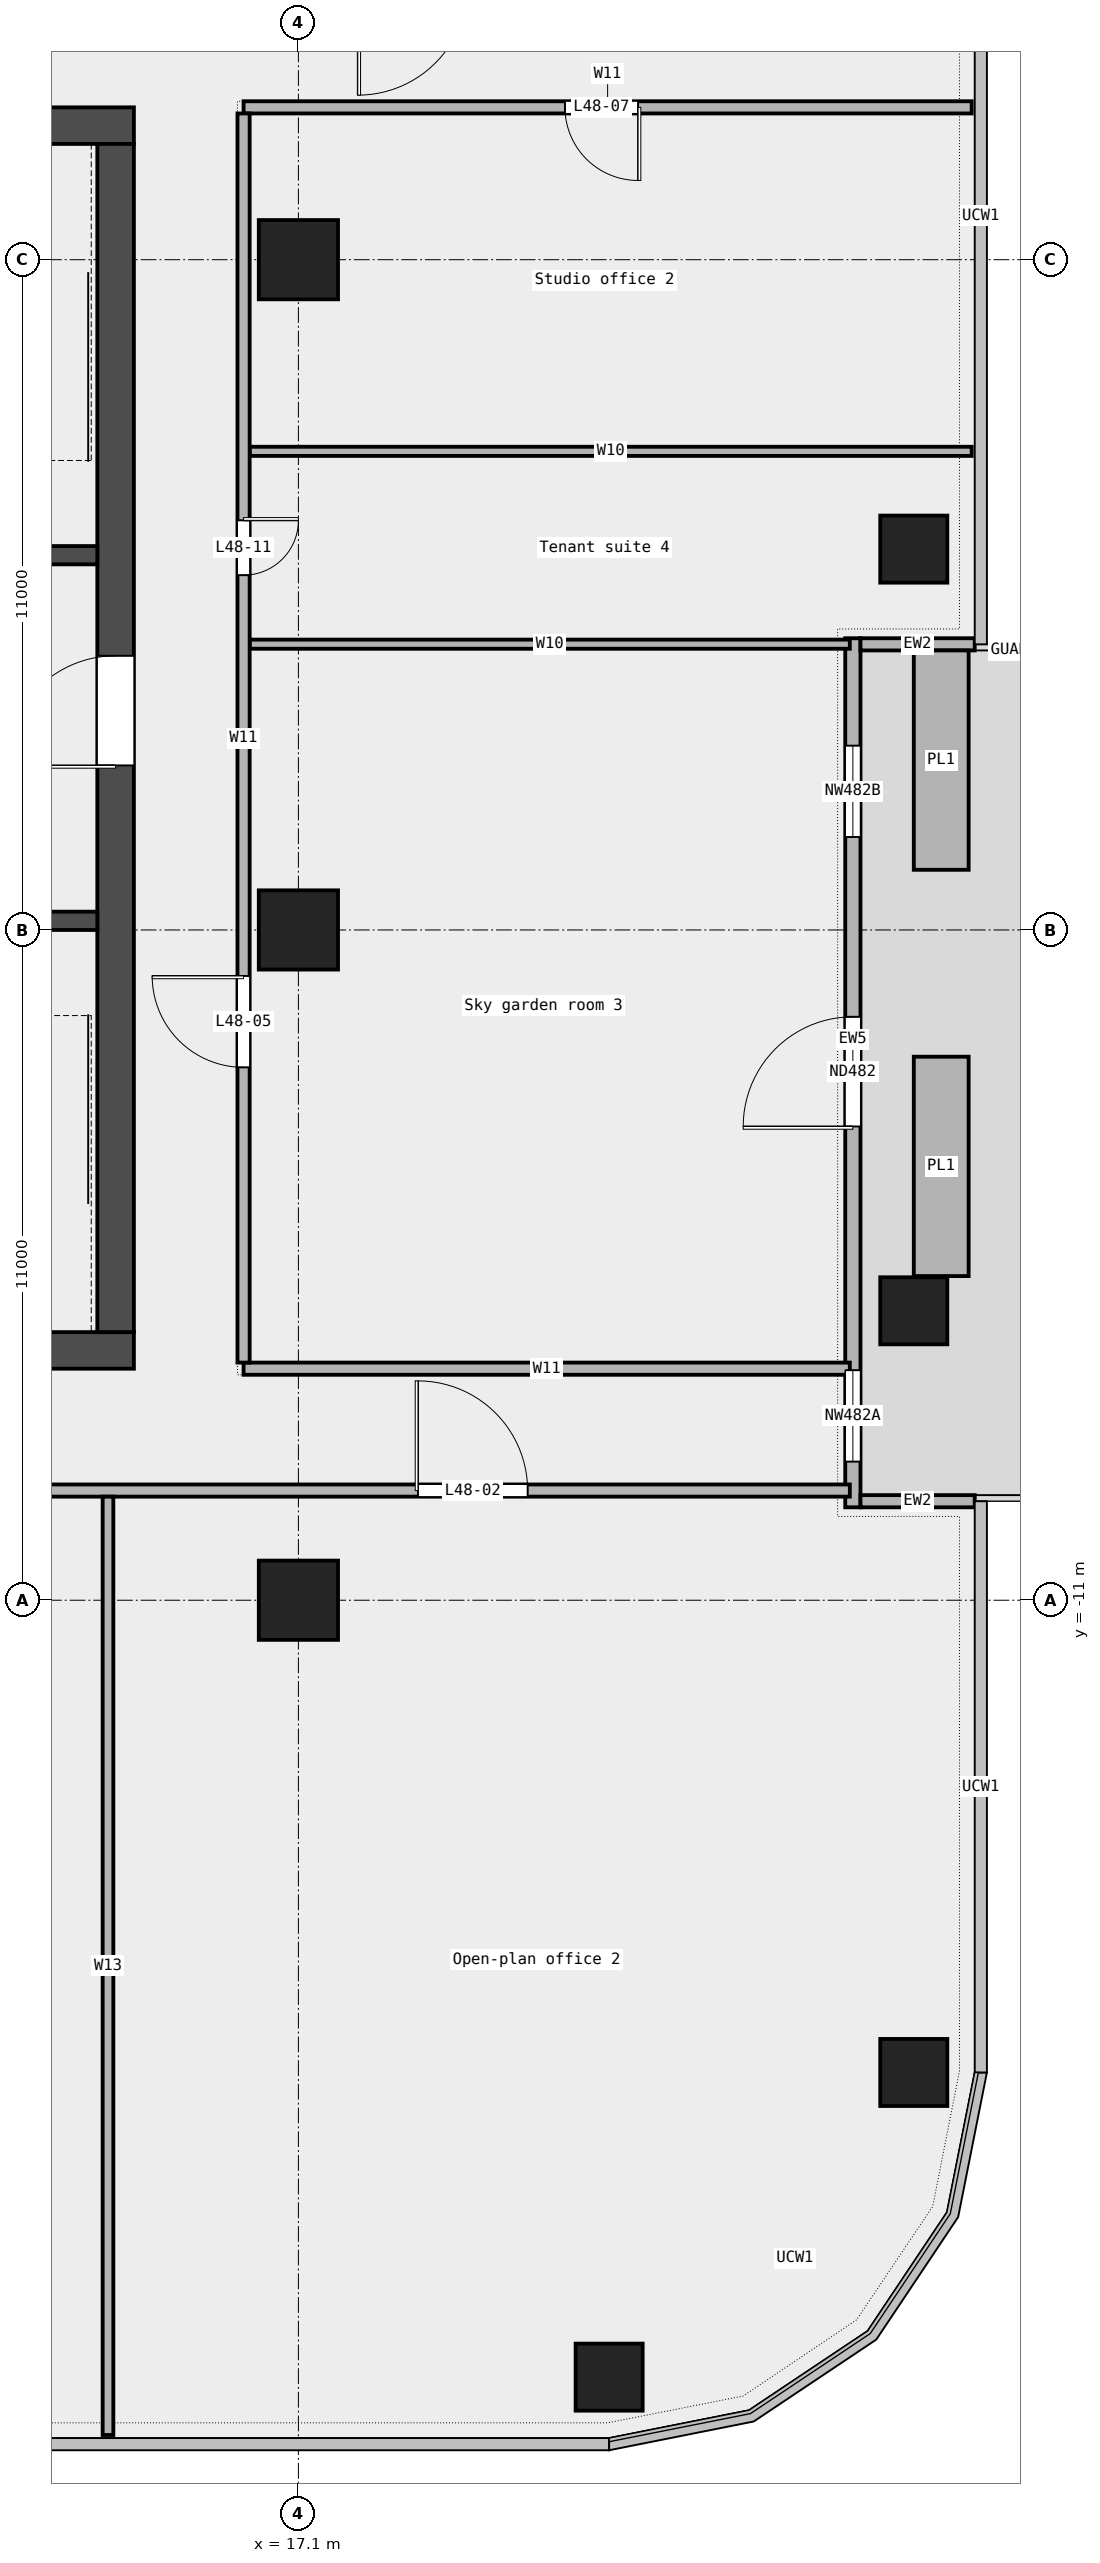
"""IFC4 building model, lengths in metres.
Left out: names, types, materials, properties, quantities, classifications, styles, units other than length and angle.
Written with IfcOpenShell. Run it as: python <this file> out.ifc"""

import sys

from ifc_helpers import new_model, si_unit, direction, frame, frame_2d, origin, origin_2d, place, context, subcontext, project, spatial, rectangle, extrude, element, fill, save


model = new_model("IFC4")
c1 = context("Model", 3, precision=1e-05, world=origin(), true_north=direction((0.0, 1.0)))
c2 = subcontext(c1, "Body", "Model", "MODEL_VIEW")
j1 = project(units=[si_unit("LENGTHUNIT", "METRE"), si_unit("PLANEANGLEUNIT", "RADIAN")], contexts=[c1])
p1 = place(None, origin())
s1 = spatial("IfcSite", under=j1, at=p1, CompositionType="ELEMENT")
p2 = place(p1, origin())
s2 = spatial("IfcBuilding", under=s1, at=p2, CompositionType="ELEMENT")
p3 = place(p2, frame((0.0, 0.0, 227.0)))
s3 = spatial("IfcBuildingStorey", under=s2, at=p3, CompositionType="ELEMENT", Elevation=227.0)
for number, where, z_axis, x_axis in (
    (1, (22.2, -23.75, 0.0), (0.0, 0.0, 1.0), (1.0, 0.0, 0.0)),
    (2, (27.2, -18.75, 0.0), (0.0, 0.0, 1.0), (1.0, 0.0, 0.0)),
    (3, (27.2, -6.25, 0.0), (0.0, 0.0, 1.0), (1.0, 0.0, 0.0)),
    (4, (27.2, 6.25, 0.0), (0.0, 0.0, 1.0), (1.0, 0.0, 0.0)),
):
    element("IfcColumn", number, at=place(p3, frame(where, z_axis=z_axis, x_axis=x_axis)), inside=s3, PredefinedType="COLUMN", context=c2, shape_type="SweptSolid", body=[
        extrude(rectangle(XDim=1.1, YDim=1.1, at=origin_2d()), origin(), (0.0, 0.0, 1.0), 3.6),
    ])
for number, where, z_axis, x_axis in (
    (5, (17.1, -11.0, 0.0), (0.0, 0.0, 1.0), (1.0, 0.0, 0.0)),
    (6, (17.1, 0.0, 0.0), (0.0, 0.0, 1.0), (1.0, 0.0, 0.0)),
    (7, (17.1, 11.0, 0.0), (0.0, 0.0, 1.0), (1.0, 0.0, 0.0)),
):
    element("IfcColumn", number, at=place(p3, frame(where, z_axis=z_axis, x_axis=x_axis)), inside=s3, PredefinedType="COLUMN", context=c2, shape_type="SweptSolid", body=[
        extrude(rectangle(XDim=1.3, YDim=1.3, at=origin_2d()), origin(), (0.0, 0.0, 1.0), 3.6),
    ])
p4 = place(p3, frame((26.2, -9.475, 0.0), z_axis=(0.0, 0.0, 1.0), x_axis=(0.0, 1.0, 0.0)))
e8 = element("IfcWall", 8, at=p4, inside=s3, PredefinedType="STANDARD", context=c2, shape_type="SweptSolid", body=[
    extrude(rectangle(XDim=14.263, YDim=0.25, at=frame_2d((7.131, 0.0))), origin(), (0.0, 0.0, 1.0), 3.6),
])
p5 = place(p4, frame((0.75, 0.0, 0.45)))
e9 = element("IfcOpeningElement", 9, at=p5, cuts=e8, PredefinedType="OPENING", context=c2, shape_type="SweptSolid", body=[
    extrude(rectangle(XDim=1.5, YDim=2.4, at=frame_2d((0.75, 1.2))), frame((0.0, 0.137, 0.0), z_axis=(0.0, -1.0, 0.0), x_axis=(1.0, 0.0, 0.0)), (0.0, 0.0, 1.0), 0.274),
])
p6 = place(p4, frame((6.25, 0.0, 0.0)))
e10 = element("IfcOpeningElement", 10, at=p6, cuts=e8, PredefinedType="OPENING", context=c2, shape_type="SweptSolid", body=[
    extrude(rectangle(XDim=1.8, YDim=2.4, at=frame_2d((0.9, 1.2))), frame((0.0, 0.137, 0.0), z_axis=(0.0, -1.0, 0.0), x_axis=(1.0, 0.0, 0.0)), (0.0, 0.0, 1.0), 0.274),
])
p7 = place(p4, frame((11.0, 0.0, 0.45)))
e11 = element("IfcOpeningElement", 11, at=p7, cuts=e8, PredefinedType="OPENING", context=c2, shape_type="SweptSolid", body=[
    extrude(rectangle(XDim=1.5, YDim=2.4, at=frame_2d((0.75, 1.2))), frame((0.0, 0.137, 0.0), z_axis=(0.0, -1.0, 0.0), x_axis=(1.0, 0.0, 0.0)), (0.0, 0.0, 1.0), 0.274),
])
for number, where, z_axis, x_axis in (
    (12, (28.2, -9.375, 0.0), (0.0, 0.0, 1.0), (-1.0, 0.0, 0.0)),
    (13, (28.2, 4.688, 0.0), (0.0, 0.0, 1.0), (-1.0, 0.0, 0.0)),
):
    element("IfcWall", number, at=place(p3, frame(where, z_axis=z_axis, x_axis=x_axis)), inside=s3, PredefinedType="STANDARD", context=c2, shape_type="SweptSolid", body=[
        extrude(rectangle(XDim=1.875, YDim=0.2, at=frame_2d((0.938, 0.0))), origin(), (0.0, 0.0, 1.0), 3.6),
    ])
for number, where, z_axis, x_axis in (
    (14, (27.65, -5.68, 0.0), (0.0, 0.0, 1.0), (0.0, 1.0, 0.0)),
    (15, (27.65, 0.988, 0.0), (0.0, 0.0, 1.0), (0.0, 1.0, 0.0)),
):
    element("IfcWall", number, at=place(p3, frame(where, z_axis=z_axis, x_axis=x_axis)), inside=s3, PredefinedType="STANDARD", context=c2, shape_type="SweptSolid", body=[
        extrude(rectangle(XDim=3.6, YDim=0.9, at=frame_2d((1.8, 0.0))), origin(), (0.0, 0.0, 1.0), 0.7),
    ])
p8 = place(p3, frame((-28.15, -9.2, 0.0), z_axis=(0.0, 0.0, 1.0), x_axis=(1.0, 0.0, 0.0)))
e16 = element("IfcWall", 16, at=p8, inside=s3, PredefinedType="PARTITIONING", context=c2, shape_type="SweptSolid", body=[
    extrude(rectangle(XDim=54.3, YDim=0.2, at=frame_2d((27.15, 0.0))), origin(), (0.0, 0.0, 1.0), 3.6),
])
p9 = place(p8, frame((47.212, 0.0, 0.0)))
e17 = element("IfcOpeningElement", 17, at=p9, cuts=e16, PredefinedType="OPENING", context=c2, shape_type="SweptSolid", body=[
    extrude(rectangle(XDim=1.8, YDim=2.1, at=frame_2d((0.9, 1.05))), frame((0.0, 0.112, 0.0), z_axis=(0.0, -1.0, 0.0), x_axis=(1.0, 0.0, 0.0)), (0.0, 0.0, 1.0), 0.224),
])
p10 = place(p8, frame((16.15, 0.0, 0.0)))
e18 = element("IfcOpeningElement", 18, at=p10, cuts=e16, PredefinedType="OPENING", context=c2, shape_type="SweptSolid", body=[
    extrude(rectangle(XDim=1.8, YDim=2.1, at=frame_2d((0.9, 1.05))), frame((0.0, 0.112, 0.0), z_axis=(0.0, -1.0, 0.0), x_axis=(1.0, 0.0, 0.0)), (0.0, 0.0, 1.0), 0.224),
])
p11 = place(p8, frame((4.545, 0.0, 0.0)))
e19 = element("IfcOpeningElement", 19, at=p11, cuts=e16, PredefinedType="OPENING", context=c2, shape_type="SweptSolid", body=[
    extrude(rectangle(XDim=1.5, YDim=2.1, at=frame_2d((0.75, 1.05))), frame((0.0, 0.112, 0.0), z_axis=(0.0, -1.0, 0.0), x_axis=(1.0, 0.0, 0.0)), (0.0, 0.0, 1.0), 0.224),
])
p12 = place(p8, frame((31.117, 0.0, 0.0)))
e20 = element("IfcOpeningElement", 20, at=p12, cuts=e16, PredefinedType="OPENING", context=c2, shape_type="SweptSolid", body=[
    extrude(rectangle(XDim=1.8, YDim=2.1, at=frame_2d((0.9, 1.05))), frame((0.0, 0.112, 0.0), z_axis=(0.0, -1.0, 0.0), x_axis=(1.0, 0.0, 0.0)), (0.0, 0.0, 1.0), 0.224),
])
p13 = place(p3, frame((16.2, -7.2, 0.0), z_axis=(0.0, 0.0, 1.0), x_axis=(1.0, 0.0, 0.0)))
e21 = element("IfcWall", 21, at=p13, inside=s3, PredefinedType="PARTITIONING", context=c2, shape_type="SweptSolid", body=[
    extrude(rectangle(XDim=9.95, YDim=0.2, at=frame_2d((4.975, 0.0))), origin(), (0.0, 0.0, 1.0), 3.6),
])
p14 = place(p3, frame((16.3, 4.69, 0.0), z_axis=(0.0, 0.0, 1.0), x_axis=(1.0, 0.0, 0.0)))
e22 = element("IfcWall", 22, at=p14, inside=s3, PredefinedType="PARTITIONING", context=c2, shape_type="SweptSolid", body=[
    extrude(rectangle(XDim=9.85, YDim=0.15, at=frame_2d((4.925, 0.0))), origin(), (0.0, 0.0, 1.0), 3.6),
])
p15 = place(p3, frame((16.3, 7.855, 0.0), z_axis=(0.0, 0.0, 1.0), x_axis=(1.0, 0.0, 0.0)))
e23 = element("IfcWall", 23, at=p15, inside=s3, PredefinedType="PARTITIONING", context=c2, shape_type="SweptSolid", body=[
    extrude(rectangle(XDim=11.85, YDim=0.15, at=frame_2d((5.925, 0.0))), origin(), (0.0, 0.0, 1.0), 3.6),
])
p16 = place(p3, frame((16.2, 13.5, 0.0), z_axis=(0.0, 0.0, 1.0), x_axis=(1.0, 0.0, 0.0)))
e24 = element("IfcWall", 24, at=p16, inside=s3, PredefinedType="PARTITIONING", context=c2, shape_type="SweptSolid", body=[
    extrude(rectangle(XDim=11.95, YDim=0.2, at=frame_2d((5.975, 0.0))), origin(), (0.0, 0.0, 1.0), 3.6),
])
p17 = place(p16, frame((5.275, 0.0, 0.0)))
e25 = element("IfcOpeningElement", 25, at=p17, cuts=e24, PredefinedType="OPENING", context=c2, shape_type="SweptSolid", body=[
    extrude(rectangle(XDim=1.2, YDim=2.1, at=frame_2d((0.6, 1.05))), frame((0.0, 0.112, 0.0), z_axis=(0.0, -1.0, 0.0), x_axis=(1.0, 0.0, 0.0)), (0.0, 0.0, 1.0), 0.224),
])
p18 = place(p3, frame((13.975, -24.7, 0.0), z_axis=(0.0, 0.0, 1.0), x_axis=(0.0, 1.0, 0.0)))
e26 = element("IfcWall", 26, at=p18, inside=s3, PredefinedType="PARTITIONING", context=c2, shape_type="SweptSolid", body=[
    extrude(rectangle(XDim=15.4, YDim=0.175, at=frame_2d((7.7, 0.0))), origin(), (0.0, 0.0, 1.0), 3.6),
])
p19 = place(p3, frame((16.2, -7.1, 0.0), z_axis=(0.0, 0.0, 1.0), x_axis=(0.0, 1.0, 0.0)))
e27 = element("IfcWall", 27, at=p19, inside=s3, PredefinedType="PARTITIONING", context=c2, shape_type="SweptSolid", body=[
    extrude(rectangle(XDim=20.5, YDim=0.2, at=frame_2d((10.25, 0.0))), origin(), (0.0, 0.0, 1.0), 3.6),
])
p20 = place(p19, frame((4.845, 0.0, 0.0)))
e28 = element("IfcOpeningElement", 28, at=p20, cuts=e27, PredefinedType="OPENING", context=c2, shape_type="SweptSolid", body=[
    extrude(rectangle(XDim=1.5, YDim=2.1, at=frame_2d((0.75, 1.05))), frame((0.0, 0.112, 0.0), z_axis=(0.0, -1.0, 0.0), x_axis=(1.0, 0.0, 0.0)), (0.0, 0.0, 1.0), 0.224),
])
p21 = place(p19, frame((12.923, 0.0, 0.0)))
e29 = element("IfcOpeningElement", 29, at=p21, cuts=e27, PredefinedType="OPENING", context=c2, shape_type="SweptSolid", body=[
    extrude(rectangle(XDim=0.9, YDim=2.1, at=frame_2d((0.45, 1.05))), frame((0.0, 0.112, 0.0), z_axis=(0.0, -1.0, 0.0), x_axis=(1.0, 0.0, 0.0)), (0.0, 0.0, 1.0), 0.224),
])
p22 = place(p3, frame((-14.4, -6.9, 0.0), z_axis=(0.0, 0.0, 1.0), x_axis=(1.0, 0.0, 0.0)))
e30 = element("IfcWall", 30, at=p22, inside=s3, PredefinedType="SHEAR", context=c2, shape_type="SweptSolid", body=[
    extrude(rectangle(XDim=28.8, YDim=0.6, at=frame_2d((14.4, 0.0))), origin(), (0.0, 0.0, 1.0), 3.7),
])
p23 = place(p22, frame((4.337, 0.0, 0.0)))
e31 = element("IfcOpeningElement", 31, at=p23, cuts=e30, PredefinedType="OPENING", context=c2, shape_type="SweptSolid", body=[
    extrude(rectangle(XDim=1.0, YDim=2.1, at=frame_2d((0.5, 1.05))), frame((0.0, 0.312, 0.0), z_axis=(0.0, -1.0, 0.0), x_axis=(1.0, 0.0, 0.0)), (0.0, 0.0, 1.0), 0.624),
])
p24 = place(p22, frame((6.212, 0.0, 0.0)))
e32 = element("IfcOpeningElement", 32, at=p24, cuts=e30, PredefinedType="OPENING", context=c2, shape_type="SweptSolid", body=[
    extrude(rectangle(XDim=1.0, YDim=2.1, at=frame_2d((0.5, 1.05))), frame((0.0, 0.312, 0.0), z_axis=(0.0, -1.0, 0.0), x_axis=(1.0, 0.0, 0.0)), (0.0, 0.0, 1.0), 0.624),
])
p25 = place(p22, frame((8.087, 0.0, 0.0)))
e33 = element("IfcOpeningElement", 33, at=p25, cuts=e30, PredefinedType="OPENING", context=c2, shape_type="SweptSolid", body=[
    extrude(rectangle(XDim=1.0, YDim=2.1, at=frame_2d((0.5, 1.05))), frame((0.0, 0.312, 0.0), z_axis=(0.0, -1.0, 0.0), x_axis=(1.0, 0.0, 0.0)), (0.0, 0.0, 1.0), 0.624),
])
p26 = place(p22, frame((12.675, 0.0, 0.0)))
e34 = element("IfcOpeningElement", 34, at=p26, cuts=e30, PredefinedType="OPENING", context=c2, shape_type="SweptSolid", body=[
    extrude(rectangle(XDim=1.2, YDim=2.1, at=frame_2d((0.6, 1.05))), frame((0.0, 0.312, 0.0), z_axis=(0.0, -1.0, 0.0), x_axis=(1.0, 0.0, 0.0)), (0.0, 0.0, 1.0), 0.624),
])
p27 = place(p22, frame((18.75, 0.0, 0.0)))
e35 = element("IfcOpeningElement", 35, at=p27, cuts=e30, PredefinedType="OPENING", context=c2, shape_type="SweptSolid", body=[
    extrude(rectangle(XDim=1.8, YDim=2.1, at=frame_2d((0.9, 1.05))), frame((0.0, 0.312, 0.0), z_axis=(0.0, -1.0, 0.0), x_axis=(1.0, 0.0, 0.0)), (0.0, 0.0, 1.0), 0.624),
])
p28 = place(p22, frame((23.087, 0.0, 0.0)))
e36 = element("IfcOpeningElement", 36, at=p28, cuts=e30, PredefinedType="OPENING", context=c2, shape_type="SweptSolid", body=[
    extrude(rectangle(XDim=1.0, YDim=2.1, at=frame_2d((0.5, 1.05))), frame((0.0, 0.312, 0.0), z_axis=(0.0, -1.0, 0.0), x_axis=(1.0, 0.0, 0.0)), (0.0, 0.0, 1.0), 0.624),
])
p29 = place(p3, frame((-14.4, 13.2, 0.0), z_axis=(0.0, 0.0, 1.0), x_axis=(1.0, 0.0, 0.0)))
e37 = element("IfcWall", 37, at=p29, inside=s3, PredefinedType="SHEAR", context=c2, shape_type="SweptSolid", body=[
    extrude(rectangle(XDim=28.8, YDim=0.6, at=frame_2d((14.4, 0.0))), origin(), (0.0, 0.0, 1.0), 3.7),
])
p30 = place(p29, frame((6.3, 0.0, 0.0)))
e38 = element("IfcOpeningElement", 38, at=p30, cuts=e37, PredefinedType="OPENING", context=c2, shape_type="SweptSolid", body=[
    extrude(rectangle(XDim=1.2, YDim=2.1, at=frame_2d((0.6, 1.05))), frame((0.0, 0.312, 0.0), z_axis=(0.0, -1.0, 0.0), x_axis=(1.0, 0.0, 0.0)), (0.0, 0.0, 1.0), 0.624),
])
p31 = place(p29, frame((21.3, 0.0, 0.0)))
e39 = element("IfcOpeningElement", 39, at=p31, cuts=e37, PredefinedType="OPENING", context=c2, shape_type="SweptSolid", body=[
    extrude(rectangle(XDim=1.2, YDim=2.1, at=frame_2d((0.6, 1.05))), frame((0.0, 0.312, 0.0), z_axis=(0.0, -1.0, 0.0), x_axis=(1.0, 0.0, 0.0)), (0.0, 0.0, 1.0), 0.624),
])
p32 = place(p3, frame((14.1, -6.6, 0.0), z_axis=(0.0, 0.0, 1.0), x_axis=(0.0, 1.0, 0.0)))
e40 = element("IfcWall", 40, at=p32, inside=s3, PredefinedType="SHEAR", context=c2, shape_type="SweptSolid", body=[
    extrude(rectangle(XDim=19.5, YDim=0.6, at=frame_2d((9.75, 0.0))), origin(), (0.0, 0.0, 1.0), 3.7),
])
p33 = place(p32, frame((9.3, 0.0, 0.0)))
e41 = element("IfcOpeningElement", 41, at=p33, cuts=e40, PredefinedType="OPENING", context=c2, shape_type="SweptSolid", body=[
    extrude(rectangle(XDim=1.8, YDim=2.1, at=frame_2d((0.9, 1.05))), frame((0.0, 0.312, 0.0), z_axis=(0.0, -1.0, 0.0), x_axis=(1.0, 0.0, 0.0)), (0.0, 0.0, 1.0), 0.624),
])
p34 = place(p3, frame((10.65, 0.15, 0.0), z_axis=(0.0, 0.0, 1.0), x_axis=(1.0, 0.0, 0.0)))
e42 = element("IfcWall", 42, at=p34, inside=s3, PredefinedType="SOLIDWALL", context=c2, shape_type="SweptSolid", body=[
    extrude(rectangle(XDim=3.15, YDim=0.3, at=frame_2d((1.575, 0.0))), origin(), (0.0, 0.0, 1.0), 3.7),
])
p35 = place(p34, frame((1.025, 0.0, 0.0)))
e43 = element("IfcOpeningElement", 43, at=p35, cuts=e42, PredefinedType="OPENING", context=c2, shape_type="SweptSolid", body=[
    extrude(rectangle(XDim=1.1, YDim=2.1, at=frame_2d((0.55, 1.05))), frame((0.0, 0.162, 0.0), z_axis=(0.0, -1.0, 0.0), x_axis=(1.0, 0.0, 0.0)), (0.0, 0.0, 1.0), 0.324),
])
p36 = place(p3, frame((10.65, 6.15, 0.0), z_axis=(0.0, 0.0, 1.0), x_axis=(1.0, 0.0, 0.0)))
e44 = element("IfcWall", 44, at=p36, inside=s3, PredefinedType="SOLIDWALL", context=c2, shape_type="SweptSolid", body=[
    extrude(rectangle(XDim=3.15, YDim=0.3, at=frame_2d((1.575, 0.0))), origin(), (0.0, 0.0, 1.0), 3.7),
])
p37 = place(p36, frame((1.025, 0.0, 0.0)))
e45 = element("IfcOpeningElement", 45, at=p37, cuts=e44, PredefinedType="OPENING", context=c2, shape_type="SweptSolid", body=[
    extrude(rectangle(XDim=1.1, YDim=2.1, at=frame_2d((0.55, 1.05))), frame((0.0, 0.162, 0.0), z_axis=(0.0, -1.0, 0.0), x_axis=(1.0, 0.0, 0.0)), (0.0, 0.0, 1.0), 0.324),
])
p38 = place(p5, origin())
e46 = element("IfcWindow", 46, at=p38, inside=s3, PartitioningType="SINGLE_PANEL", PredefinedType="WINDOW", context=c2, shape_type="SweptSolid", body=[
    extrude(rectangle(XDim=1.5, YDim=2.4, at=frame_2d((0.75, 1.2))), frame((0.0, 0.03, 0.0), z_axis=(0.0, -1.0, 0.0), x_axis=(1.0, 0.0, 0.0)), (0.0, 0.0, 1.0), 0.06),
])
fill(e9, e46)
p39 = place(p6, origin())
e47 = element("IfcDoor", 47, at=p39, inside=s3, OperationType="DOUBLE_DOOR_SINGLE_SWING", PredefinedType="DOOR", context=c2, shape_type="SweptSolid", body=[
    extrude(rectangle(XDim=1.8, YDim=2.4, at=frame_2d((0.9, 1.2))), frame((0.0, 0.025, 0.0), z_axis=(0.0, -1.0, 0.0), x_axis=(1.0, 0.0, 0.0)), (0.0, 0.0, 1.0), 0.05),
])
fill(e10, e47)
p40 = place(p7, origin())
e48 = element("IfcWindow", 48, at=p40, inside=s3, PartitioningType="SINGLE_PANEL", PredefinedType="WINDOW", context=c2, shape_type="SweptSolid", body=[
    extrude(rectangle(XDim=1.5, YDim=2.4, at=frame_2d((0.75, 1.2))), frame((0.0, 0.03, 0.0), z_axis=(0.0, -1.0, 0.0), x_axis=(1.0, 0.0, 0.0)), (0.0, 0.0, 1.0), 0.06),
])
fill(e11, e48)
p41 = place(p9, origin())
e49 = element("IfcDoor", 49, at=p41, inside=s3, OperationType="DOUBLE_DOOR_SINGLE_SWING", PredefinedType="DOOR", context=c2, shape_type="SweptSolid", body=[
    extrude(rectangle(XDim=1.8, YDim=2.1, at=frame_2d((0.9, 1.05))), frame((0.0, 0.025, 0.0), z_axis=(0.0, -1.0, 0.0), x_axis=(1.0, 0.0, 0.0)), (0.0, 0.0, 1.0), 0.05),
])
fill(e17, e49)
p42 = place(p20, origin())
e50 = element("IfcDoor", 50, at=p42, inside=s3, OperationType="DOUBLE_DOOR_SINGLE_SWING", PredefinedType="DOOR", context=c2, shape_type="SweptSolid", body=[
    extrude(rectangle(XDim=1.5, YDim=2.1, at=frame_2d((0.75, 1.05))), frame((0.0, 0.025, 0.0), z_axis=(0.0, -1.0, 0.0), x_axis=(1.0, 0.0, 0.0)), (0.0, 0.0, 1.0), 0.05),
])
fill(e28, e50)
p43 = place(p17, origin())
e51 = element("IfcDoor", 51, at=p43, inside=s3, OperationType="SINGLE_SWING_LEFT", PredefinedType="DOOR", context=c2, shape_type="SweptSolid", body=[
    extrude(rectangle(XDim=1.2, YDim=2.1, at=frame_2d((0.6, 1.05))), frame((0.0, 0.025, 0.0), z_axis=(0.0, -1.0, 0.0), x_axis=(1.0, 0.0, 0.0)), (0.0, 0.0, 1.0), 0.05),
])
fill(e25, e51)
p44 = place(p21, origin())
e52 = element("IfcDoor", 52, at=p44, inside=s3, OperationType="SINGLE_SWING_LEFT", PredefinedType="DOOR", context=c2, shape_type="SweptSolid", body=[
    extrude(rectangle(XDim=0.9, YDim=2.1, at=frame_2d((0.45, 1.05))), frame((0.0, 0.025, 0.0), z_axis=(0.0, -1.0, 0.0), x_axis=(1.0, 0.0, 0.0)), (0.0, 0.0, 1.0), 0.05),
])
fill(e29, e52)
p45 = place(p33, origin())
e53 = element("IfcDoor", 53, at=p45, inside=s3, OperationType="DOUBLE_DOOR_SINGLE_SWING", PredefinedType="DOOR", context=c2, shape_type="SweptSolid", body=[
    extrude(rectangle(XDim=1.8, YDim=2.1, at=frame_2d((0.9, 1.05))), frame((0.0, 0.025, 0.0), z_axis=(0.0, -1.0, 0.0), x_axis=(1.0, 0.0, 0.0)), (0.0, 0.0, 1.0), 0.05),
])
fill(e41, e53)
save(model, sys.argv[1])
